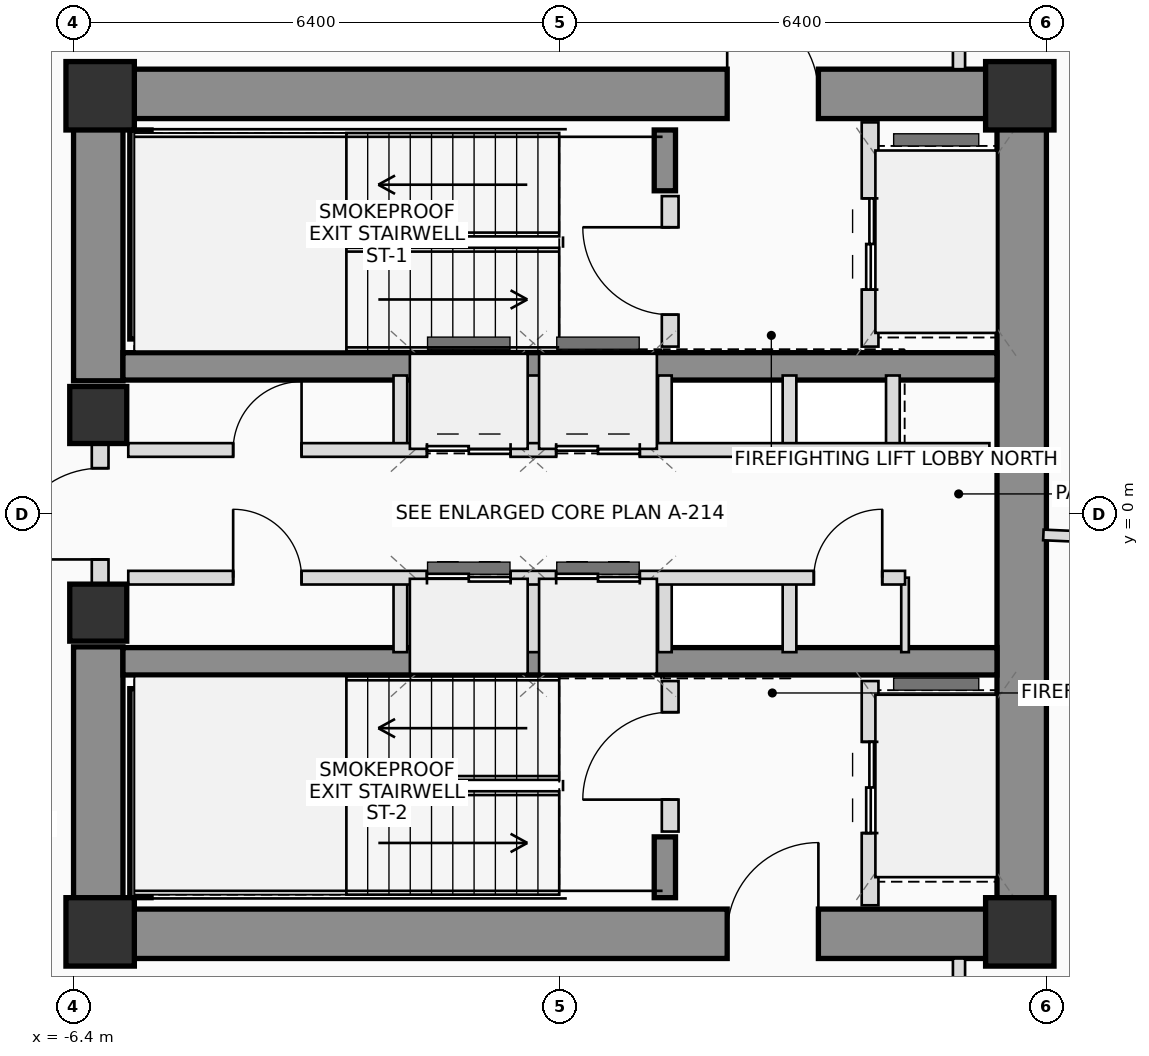
"""IFC4 building model, lengths in metres.
Left out: names, types, materials, properties, quantities, classifications, styles, units other than length and angle.
Written with IfcOpenShell. Run it as: python <this file> out.ifc"""

import sys

from ifc_helpers import new_model, si_unit, direction, frame, frame_2d, origin, origin_2d, place, context, subcontext, project, spatial, rectangle, extrude, source, transform, mapped, element, fill, save


model = new_model("IFC4")
c1 = context("Model", 3, precision=1e-05, world=origin(), true_north=direction((0.0, 1.0)))
c2 = subcontext(c1, "Body", "Model", "MODEL_VIEW")
j1 = project(units=[si_unit("LENGTHUNIT", "METRE"), si_unit("PLANEANGLEUNIT", "RADIAN")], contexts=[c1])
p1 = place(None, origin())
s1 = spatial("IfcSite", under=j1, at=p1, CompositionType="ELEMENT")
p2 = place(p1, origin())
s2 = spatial("IfcBuilding", under=s1, at=p2, CompositionType="ELEMENT")
p3 = place(p2, frame((0.0, 0.0, 146.75)))
s3 = spatial("IfcBuildingStorey", under=s2, at=p3, CompositionType="ELEMENT", Elevation=146.75)
m1 = source(origin(), c2, "Body", "SweptSolid", [
    extrude(rectangle(XDim=0.9, YDim=0.9, at=origin_2d()), origin(), (0.0, 0.0, 1.0), 3.45),
])
for number, where, z_axis, x_axis in (
    (1, (-6.05, -5.5, 0.0), (0.0, 0.0, 1.0), (1.0, 0.0, 0.0)),
    (2, (6.05, -5.5, 0.0), (0.0, 0.0, 1.0), (1.0, 0.0, 0.0)),
    (3, (6.05, 5.5, 0.0), (0.0, 0.0, 1.0), (1.0, 0.0, 0.0)),
    (4, (-6.05, 5.5, 0.0), (0.0, 0.0, 1.0), (1.0, 0.0, 0.0)),
):
    element("IfcColumn", number, at=place(p3, frame(where, z_axis=z_axis, x_axis=x_axis)), inside=s3, PredefinedType="COLUMN", context=c2, shape_type="MappedRepresentation", body=[
        mapped(m1, transform((0.0, 0.0, 0.0), scale=1.0)),
    ])
p4 = place(p3, frame((-6.4, 5.525, 0.0), z_axis=(0.0, 0.0, 1.0), x_axis=(1.0, 0.0, 0.0)))
e5 = element("IfcWall", 5, at=p4, inside=s3, PredefinedType="SHEAR", context=c2, shape_type="SweptSolid", body=[
    extrude(rectangle(XDim=12.8, YDim=0.65, at=frame_2d((6.4, 0.0))), origin(), (0.0, 0.0, 1.0), 3.45),
])
p5 = place(p4, frame((8.6, 0.0, 0.0)))
e6 = element("IfcOpeningElement", 6, at=p5, cuts=e5, PredefinedType="OPENING", context=c2, shape_type="SweptSolid", body=[
    extrude(rectangle(XDim=1.2, YDim=2.2, at=frame_2d((0.6, 1.1))), frame((0.0, 0.335, 0.0), z_axis=(0.0, -1.0, 0.0), x_axis=(1.0, 0.0, 0.0)), (0.0, 0.0, 1.0), 0.67),
])
p6 = place(p3, frame((-6.4, -5.525, 0.0), z_axis=(0.0, 0.0, 1.0), x_axis=(1.0, 0.0, 0.0)))
e7 = element("IfcWall", 7, at=p6, inside=s3, PredefinedType="SHEAR", context=c2, shape_type="SweptSolid", body=[
    extrude(rectangle(XDim=12.8, YDim=0.65, at=frame_2d((6.4, 0.0))), origin(), (0.0, 0.0, 1.0), 3.45),
])
p7 = place(p6, frame((8.6, 0.0, 0.0)))
e8 = element("IfcOpeningElement", 8, at=p7, cuts=e7, PredefinedType="OPENING", context=c2, shape_type="SweptSolid", body=[
    extrude(rectangle(XDim=1.2, YDim=2.2, at=frame_2d((0.6, 1.1))), frame((0.0, 0.335, 0.0), z_axis=(0.0, -1.0, 0.0), x_axis=(1.0, 0.0, 0.0)), (0.0, 0.0, 1.0), 0.67),
])
p8 = place(p3, frame((6.075, -5.2, 0.0), z_axis=(0.0, 0.0, 1.0), x_axis=(0.0, 1.0, 0.0)))
e9 = element("IfcWall", 9, at=p8, inside=s3, PredefinedType="SHEAR", context=c2, shape_type="SweptSolid", body=[
    extrude(rectangle(XDim=10.4, YDim=0.65, at=frame_2d((5.2, 0.0))), origin(), (0.0, 0.0, 1.0), 3.45),
])
for number, where, z_axis, x_axis in (
    (10, (-6.075, -5.2, 0.0), (0.0, 0.0, 1.0), (0.0, 1.0, 0.0)),
    (11, (-6.075, 1.75, 0.0), (0.0, 0.0, 1.0), (0.0, 1.0, 0.0)),
):
    element("IfcWall", number, at=place(p3, frame(where, z_axis=z_axis, x_axis=x_axis)), inside=s3, PredefinedType="SHEAR", context=c2, shape_type="SweptSolid", body=[
        extrude(rectangle(XDim=3.45, YDim=0.65, at=frame_2d((1.725, 0.0))), origin(), (0.0, 0.0, 1.0), 3.45),
    ])
for number, where, z_axis, x_axis in (
    (12, (-5.75, 1.94, 0.0), (0.0, 0.0, 1.0), (1.0, 0.0, 0.0)),
    (13, (-5.75, -1.94, 0.0), (0.0, 0.0, 1.0), (1.0, 0.0, 0.0)),
):
    element("IfcWall", number, at=place(p3, frame(where, z_axis=z_axis, x_axis=x_axis)), inside=s3, PredefinedType="SHEAR", context=c2, shape_type="SweptSolid", body=[
        extrude(rectangle(XDim=11.5, YDim=0.36, at=frame_2d((5.75, 0.0))), origin(), (0.0, 0.0, 1.0), 3.45),
    ])
p9 = place(p3, frame((-5.52, 2.3, 0.0), z_axis=(0.0, 0.0, 1.0), x_axis=(0.0, 1.0, 0.0)))
e14 = element("IfcWall", 14, at=p9, inside=s3, PredefinedType="SHEAR", context=c2, shape_type="SweptSolid", body=[
    extrude(rectangle(XDim=2.75, YDim=0.28, at=frame_2d((1.375, 0.0))), origin(), (0.0, 0.0, 1.0), 3.45),
])
p10 = place(p3, frame((1.38, 4.25, 0.0), z_axis=(0.0, 0.0, 1.0), x_axis=(0.0, 1.0, 0.0)))
e15 = element("IfcWall", 15, at=p10, inside=s3, PredefinedType="SHEAR", context=c2, shape_type="SweptSolid", body=[
    extrude(rectangle(XDim=0.8, YDim=0.28, at=frame_2d((0.4, 0.0))), origin(), (0.0, 0.0, 1.0), 3.45),
])
p11 = place(p3, frame((-5.52, -5.05, 0.0), z_axis=(0.0, 0.0, 1.0), x_axis=(0.0, 1.0, 0.0)))
e16 = element("IfcWall", 16, at=p11, inside=s3, PredefinedType="SHEAR", context=c2, shape_type="SweptSolid", body=[
    extrude(rectangle(XDim=2.75, YDim=0.28, at=frame_2d((1.375, 0.0))), origin(), (0.0, 0.0, 1.0), 3.45),
])
p12 = place(p3, frame((1.38, -5.05, 0.0), z_axis=(0.0, 0.0, 1.0), x_axis=(0.0, 1.0, 0.0)))
e17 = element("IfcWall", 17, at=p12, inside=s3, PredefinedType="SHEAR", context=c2, shape_type="SweptSolid", body=[
    extrude(rectangle(XDim=0.8, YDim=0.28, at=frame_2d((0.4, 0.0))), origin(), (0.0, 0.0, 1.0), 3.45),
])
m2 = source(origin(), c2, "Body", "SweptSolid", [
    extrude(rectangle(XDim=0.75, YDim=0.75, at=origin_2d()), origin(), (0.0, 0.0, 1.0), 3.45),
])
for number, where, z_axis, x_axis in (
    (18, (-6.075, -1.3, 0.0), (0.0, 0.0, 1.0), (1.0, 0.0, 0.0)),
    (19, (-6.075, 1.3, 0.0), (0.0, 0.0, 1.0), (1.0, 0.0, 0.0)),
):
    element("IfcColumn", number, at=place(p3, frame(where, z_axis=z_axis, x_axis=x_axis)), inside=s3, PredefinedType="COLUMN", context=c2, shape_type="MappedRepresentation", body=[
        mapped(m2, transform((0.0, 0.0, 0.0), scale=1.0)),
    ])
p13 = place(p3, frame((-6.05, -0.95, 0.0), z_axis=(0.0, 0.0, 1.0), x_axis=(0.0, 1.0, 0.0)))
e20 = element("IfcWall", 20, at=p13, inside=s3, PredefinedType="PLUMBINGWALL", context=c2, shape_type="SweptSolid", body=[
    extrude(rectangle(XDim=1.9, YDim=0.22, at=frame_2d((0.95, 0.0))), origin(), (0.0, 0.0, 1.0), 2.23),
])
p14 = place(p13, frame((0.35, 0.0, 0.0)))
e21 = element("IfcOpeningElement", 21, at=p14, cuts=e20, PredefinedType="OPENING", context=c2, shape_type="SweptSolid", body=[
    extrude(rectangle(XDim=1.2, YDim=2.2, at=frame_2d((0.6, 1.1))), frame((0.0, 0.12, 0.0), z_axis=(0.0, -1.0, 0.0), x_axis=(1.0, 0.0, 0.0)), (0.0, 0.0, 1.0), 0.24),
])
p15 = place(p3, frame((1.45, 2.2, 0.0), z_axis=(0.0, 0.0, 1.0), x_axis=(0.0, 1.0, 0.0)))
e22 = element("IfcWall", 22, at=p15, inside=s3, PredefinedType="PLUMBINGWALL", context=c2, shape_type="SweptSolid", body=[
    extrude(rectangle(XDim=1.98, YDim=0.22, at=frame_2d((0.99, 0.0))), origin(), (0.0, 0.0, 1.0), 3.25),
])
p16 = place(p15, frame((0.42, 0.0, 0.0)))
e23 = element("IfcOpeningElement", 23, at=p16, cuts=e22, PredefinedType="OPENING", context=c2, shape_type="SweptSolid", body=[
    extrude(rectangle(XDim=1.15, YDim=2.15, at=frame_2d((0.575, 1.075))), frame((0.0, 0.12, 0.0), z_axis=(0.0, -1.0, 0.0), x_axis=(1.0, 0.0, 0.0)), (0.0, 0.0, 1.0), 0.24),
])
p17 = place(p3, frame((4.08, 2.2, 0.0), z_axis=(0.0, 0.0, 1.0), x_axis=(0.0, 1.0, 0.0)))
e24 = element("IfcWall", 24, at=p17, inside=s3, PredefinedType="PLUMBINGWALL", context=c2, shape_type="SweptSolid", body=[
    extrude(rectangle(XDim=2.95, YDim=0.22, at=frame_2d((1.475, 0.0))), origin(), (0.0, 0.0, 1.0), 3.25),
])
p18 = place(p17, frame((0.75, 0.0, 0.0)))
e25 = element("IfcOpeningElement", 25, at=p18, cuts=e24, PredefinedType="OPENING", context=c2, shape_type="SweptSolid", body=[
    extrude(rectangle(XDim=1.2, YDim=2.25, at=frame_2d((0.6, 1.125))), frame((0.0, 0.12, 0.0), z_axis=(0.0, -1.0, 0.0), x_axis=(1.0, 0.0, 0.0)), (0.0, 0.0, 1.0), 0.24),
])
p19 = place(p3, frame((1.45, -4.18, 0.0), z_axis=(0.0, 0.0, 1.0), x_axis=(0.0, 1.0, 0.0)))
e26 = element("IfcWall", 26, at=p19, inside=s3, PredefinedType="PLUMBINGWALL", context=c2, shape_type="SweptSolid", body=[
    extrude(rectangle(XDim=1.98, YDim=0.22, at=frame_2d((0.99, 0.0))), origin(), (0.0, 0.0, 1.0), 3.25),
])
p20 = place(p19, frame((0.42, 0.0, 0.0)))
e27 = element("IfcOpeningElement", 27, at=p20, cuts=e26, PredefinedType="OPENING", context=c2, shape_type="SweptSolid", body=[
    extrude(rectangle(XDim=1.15, YDim=2.15, at=frame_2d((0.575, 1.075))), frame((0.0, 0.12, 0.0), z_axis=(0.0, -1.0, 0.0), x_axis=(1.0, 0.0, 0.0)), (0.0, 0.0, 1.0), 0.24),
])
p21 = place(p3, frame((4.08, -5.15, 0.0), z_axis=(0.0, 0.0, 1.0), x_axis=(0.0, 1.0, 0.0)))
e28 = element("IfcWall", 28, at=p21, inside=s3, PredefinedType="PLUMBINGWALL", context=c2, shape_type="SweptSolid", body=[
    extrude(rectangle(XDim=2.95, YDim=0.22, at=frame_2d((1.475, 0.0))), origin(), (0.0, 0.0, 1.0), 3.25),
])
p22 = place(p21, frame((0.95, 0.0, 0.0)))
e29 = element("IfcOpeningElement", 29, at=p22, cuts=e28, PredefinedType="OPENING", context=c2, shape_type="SweptSolid", body=[
    extrude(rectangle(XDim=1.2, YDim=2.25, at=frame_2d((0.6, 1.125))), frame((0.0, 0.12, 0.0), z_axis=(0.0, -1.0, 0.0), x_axis=(1.0, 0.0, 0.0)), (0.0, 0.0, 1.0), 0.24),
])
for number, where, z_axis, x_axis in (
    (30, (-2.1, 0.84, 0.0), (0.0, 0.0, 1.0), (0.0, 1.0, 0.0)),
    (31, (-2.1, -1.82, 0.0), (0.0, 0.0, 1.0), (0.0, 1.0, 0.0)),
    (32, (-0.35, 0.84, 0.0), (0.0, 0.0, 1.0), (0.0, 1.0, 0.0)),
    (33, (-0.35, -1.82, 0.0), (0.0, 0.0, 1.0), (0.0, 1.0, 0.0)),
    (34, (1.38, 0.84, 0.0), (0.0, 0.0, 1.0), (0.0, 1.0, 0.0)),
    (35, (1.38, -1.82, 0.0), (0.0, 0.0, 1.0), (0.0, 1.0, 0.0)),
    (36, (3.02, 0.84, 0.0), (0.0, 0.0, 1.0), (0.0, 1.0, 0.0)),
    (37, (4.38, 0.84, 0.0), (0.0, 0.0, 1.0), (0.0, 1.0, 0.0)),
    (38, (3.02, -1.82, 0.0), (0.0, 0.0, 1.0), (0.0, 1.0, 0.0)),
):
    element("IfcWall", number, at=place(p3, frame(where, z_axis=z_axis, x_axis=x_axis)), inside=s3, PredefinedType="PLUMBINGWALL", context=c2, shape_type="SweptSolid", body=[
        extrude(rectangle(XDim=0.98, YDim=0.18, at=frame_2d((0.49, 0.0))), origin(), (0.0, 0.0, 1.0), 3.25),
    ])
p23 = place(p3, frame((4.54, -1.82, 0.0), z_axis=(0.0, 0.0, 1.0), x_axis=(0.0, 1.0, 0.0)))
e39 = element("IfcWall", 39, at=p23, inside=s3, PredefinedType="PARTITIONING", context=c2, shape_type="SweptSolid", body=[
    extrude(rectangle(XDim=0.98, YDim=0.1, at=frame_2d((0.49, 0.0))), origin(), (0.0, 0.0, 1.0), 3.25),
])
p24 = place(p3, frame((-5.68, 0.84, 0.0), z_axis=(0.0, 0.0, 1.0), x_axis=(1.0, 0.0, 0.0)))
e40 = element("IfcWall", 40, at=p24, inside=s3, PredefinedType="PLUMBINGWALL", context=c2, shape_type="SweptSolid", body=[
    extrude(rectangle(XDim=11.33, YDim=0.18, at=frame_2d((5.665, 0.0))), origin(), (0.0, 0.0, 1.0), 3.25),
])
p25 = place(p24, frame((1.38, 0.0, 0.0)))
e41 = element("IfcOpeningElement", 41, at=p25, cuts=e40, PredefinedType="OPENING", context=c2, shape_type="SweptSolid", body=[
    extrude(rectangle(XDim=0.9, YDim=2.05, at=frame_2d((0.45, 1.025))), frame((0.0, 0.1, 0.0), z_axis=(0.0, -1.0, 0.0), x_axis=(1.0, 0.0, 0.0)), (0.0, 0.0, 1.0), 0.2),
])
p26 = place(p24, frame((3.93, 0.0, 0.0)))
e42 = element("IfcOpeningElement", 42, at=p26, cuts=e40, PredefinedType="OPENING", context=c2, shape_type="SweptSolid", body=[
    extrude(rectangle(XDim=1.1, YDim=2.2, at=frame_2d((0.55, 1.1))), frame((0.0, 0.1, 0.0), z_axis=(0.0, -1.0, 0.0), x_axis=(1.0, 0.0, 0.0)), (0.0, 0.0, 1.0), 0.2),
])
p27 = place(p24, frame((5.63, 0.0, 0.0)))
e43 = element("IfcOpeningElement", 43, at=p27, cuts=e40, PredefinedType="OPENING", context=c2, shape_type="SweptSolid", body=[
    extrude(rectangle(XDim=1.1, YDim=2.2, at=frame_2d((0.55, 1.1))), frame((0.0, 0.1, 0.0), z_axis=(0.0, -1.0, 0.0), x_axis=(1.0, 0.0, 0.0)), (0.0, 0.0, 1.0), 0.2),
])
p28 = place(p3, frame((-5.68, -0.84, 0.0), z_axis=(0.0, 0.0, 1.0), x_axis=(1.0, 0.0, 0.0)))
e44 = element("IfcWall", 44, at=p28, inside=s3, PredefinedType="PLUMBINGWALL", context=c2, shape_type="SweptSolid", body=[
    extrude(rectangle(XDim=10.22, YDim=0.18, at=frame_2d((5.11, 0.0))), origin(), (0.0, 0.0, 1.0), 3.25),
])
p29 = place(p28, frame((1.38, 0.0, 0.0)))
e45 = element("IfcOpeningElement", 45, at=p29, cuts=e44, PredefinedType="OPENING", context=c2, shape_type="SweptSolid", body=[
    extrude(rectangle(XDim=0.9, YDim=2.05, at=frame_2d((0.45, 1.025))), frame((0.0, 0.1, 0.0), z_axis=(0.0, -1.0, 0.0), x_axis=(1.0, 0.0, 0.0)), (0.0, 0.0, 1.0), 0.2),
])
p30 = place(p28, frame((3.93, 0.0, 0.0)))
e46 = element("IfcOpeningElement", 46, at=p30, cuts=e44, PredefinedType="OPENING", context=c2, shape_type="SweptSolid", body=[
    extrude(rectangle(XDim=1.1, YDim=2.2, at=frame_2d((0.55, 1.1))), frame((0.0, 0.1, 0.0), z_axis=(0.0, -1.0, 0.0), x_axis=(1.0, 0.0, 0.0)), (0.0, 0.0, 1.0), 0.2),
])
p31 = place(p28, frame((5.63, 0.0, 0.0)))
e47 = element("IfcOpeningElement", 47, at=p31, cuts=e44, PredefinedType="OPENING", context=c2, shape_type="SweptSolid", body=[
    extrude(rectangle(XDim=1.1, YDim=2.2, at=frame_2d((0.55, 1.1))), frame((0.0, 0.1, 0.0), z_axis=(0.0, -1.0, 0.0), x_axis=(1.0, 0.0, 0.0)), (0.0, 0.0, 1.0), 0.2),
])
p32 = place(p28, frame((9.02, 0.0, 0.0)))
e48 = element("IfcOpeningElement", 48, at=p32, cuts=e44, PredefinedType="OPENING", context=c2, shape_type="SweptSolid", body=[
    extrude(rectangle(XDim=0.9, YDim=2.05, at=frame_2d((0.45, 1.025))), frame((0.0, 0.1, 0.0), z_axis=(0.0, -1.0, 0.0), x_axis=(1.0, 0.0, 0.0)), (0.0, 0.0, 1.0), 0.2),
])
p33 = place(p3, frame((5.25, 7.5, 0.0), z_axis=(0.0, 0.0, 1.0), x_axis=(0.0, -1.0, 0.0)))
e49 = element("IfcWall", 49, at=p33, inside=s3, PredefinedType="PARTITIONING", context=c2, shape_type="SweptSolid", body=[
    extrude(rectangle(XDim=1.65, YDim=0.16, at=frame_2d((0.825, 0.0))), origin(), (0.0, 0.0, 1.0), 2.605),
])
p34 = place(p3, frame((5.25, -5.85, 0.0), z_axis=(0.0, 0.0, 1.0), x_axis=(0.0, -1.0, 0.0)))
e50 = element("IfcWall", 50, at=p34, inside=s3, PredefinedType="PARTITIONING", context=c2, shape_type="SweptSolid", body=[
    extrude(rectangle(XDim=1.65, YDim=0.16, at=frame_2d((0.825, 0.0))), origin(), (0.0, 0.0, 1.0), 3.25),
])
p35 = place(p3, frame((6.36, -0.278, 0.0), z_axis=(0.0, 0.0, 1.0), x_axis=(0.999047707238, -0.043631166178, 0.0)))
e51 = element("IfcWall", 51, at=p35, inside=s3, PredefinedType="PARTITIONING", context=c2, shape_type="SweptSolid", body=[
    extrude(rectangle(XDim=8.522, YDim=0.14, at=frame_2d((4.261, 0.0))), origin(), (0.0, 0.0, 1.0), 2.605),
])
p36 = place(p5, origin())
e52 = element("IfcDoor", 52, at=p36, inside=s3, OperationType="SINGLE_SWING_LEFT", PredefinedType="DOOR", context=c2, shape_type="SweptSolid", body=[
    extrude(rectangle(XDim=1.2, YDim=2.2, at=frame_2d((0.6, 1.1))), frame((0.0, 0.025, 0.0), z_axis=(0.0, -1.0, 0.0), x_axis=(1.0, 0.0, 0.0)), (0.0, 0.0, 1.0), 0.05),
])
fill(e6, e52)
p37 = place(p7, origin())
e53 = element("IfcDoor", 53, at=p37, inside=s3, OperationType="SINGLE_SWING_RIGHT", PredefinedType="DOOR", context=c2, shape_type="SweptSolid", body=[
    extrude(rectangle(XDim=1.2, YDim=2.2, at=frame_2d((0.6, 1.1))), frame((0.0, 0.025, 0.0), z_axis=(0.0, -1.0, 0.0), x_axis=(1.0, 0.0, 0.0)), (0.0, 0.0, 1.0), 0.05),
])
fill(e8, e53)
p38 = place(p14, origin())
e54 = element("IfcDoor", 54, at=p38, inside=s3, OperationType="SINGLE_SWING_LEFT", PredefinedType="DOOR", context=c2, shape_type="SweptSolid", body=[
    extrude(rectangle(XDim=1.2, YDim=2.2, at=frame_2d((0.6, 1.1))), frame((0.0, 0.025, 0.0), z_axis=(0.0, -1.0, 0.0), x_axis=(1.0, 0.0, 0.0)), (0.0, 0.0, 1.0), 0.05),
])
fill(e21, e54)
p39 = place(p16, origin())
e55 = element("IfcDoor", 55, at=p39, inside=s3, OperationType="SINGLE_SWING_RIGHT", PredefinedType="DOOR", context=c2, shape_type="SweptSolid", body=[
    extrude(rectangle(XDim=1.15, YDim=2.15, at=frame_2d((0.575, 1.075))), frame((0.0, 0.025, 0.0), z_axis=(0.0, -1.0, 0.0), x_axis=(1.0, 0.0, 0.0)), (0.0, 0.0, 1.0), 0.05),
])
fill(e23, e55)
p40 = place(p18, origin())
e56 = element("IfcDoor", 56, at=p40, inside=s3, OperationType="DOUBLE_DOOR_SLIDING", PredefinedType="DOOR", context=c2, shape_type="SweptSolid", body=[
    extrude(rectangle(XDim=1.2, YDim=2.25, at=frame_2d((0.6, 1.125))), frame((0.0, 0.025, 0.0), z_axis=(0.0, -1.0, 0.0), x_axis=(1.0, 0.0, 0.0)), (0.0, 0.0, 1.0), 0.05),
])
fill(e25, e56)
p41 = place(p20, origin())
e57 = element("IfcDoor", 57, at=p41, inside=s3, OperationType="SINGLE_SWING_LEFT", PredefinedType="DOOR", context=c2, shape_type="SweptSolid", body=[
    extrude(rectangle(XDim=1.15, YDim=2.15, at=frame_2d((0.575, 1.075))), frame((0.0, 0.025, 0.0), z_axis=(0.0, -1.0, 0.0), x_axis=(1.0, 0.0, 0.0)), (0.0, 0.0, 1.0), 0.05),
])
fill(e27, e57)
p42 = place(p22, origin())
e58 = element("IfcDoor", 58, at=p42, inside=s3, OperationType="DOUBLE_DOOR_SLIDING", PredefinedType="DOOR", context=c2, shape_type="SweptSolid", body=[
    extrude(rectangle(XDim=1.2, YDim=2.25, at=frame_2d((0.6, 1.125))), frame((0.0, 0.025, 0.0), z_axis=(0.0, -1.0, 0.0), x_axis=(1.0, 0.0, 0.0)), (0.0, 0.0, 1.0), 0.05),
])
fill(e29, e58)
p43 = place(p25, origin())
e59 = element("IfcDoor", 59, at=p43, inside=s3, OperationType="SINGLE_SWING_RIGHT", PredefinedType="DOOR", context=c2, shape_type="SweptSolid", body=[
    extrude(rectangle(XDim=0.9, YDim=2.05, at=frame_2d((0.45, 1.025))), frame((0.0, 0.025, 0.0), z_axis=(0.0, -1.0, 0.0), x_axis=(1.0, 0.0, 0.0)), (0.0, 0.0, 1.0), 0.05),
])
fill(e41, e59)
p44 = place(p26, origin())
e60 = element("IfcDoor", 60, at=p44, inside=s3, OperationType="DOUBLE_DOOR_SLIDING", PredefinedType="DOOR", context=c2, shape_type="SweptSolid", body=[
    extrude(rectangle(XDim=1.1, YDim=2.2, at=frame_2d((0.55, 1.1))), frame((0.0, 0.025, 0.0), z_axis=(0.0, -1.0, 0.0), x_axis=(1.0, 0.0, 0.0)), (0.0, 0.0, 1.0), 0.05),
])
fill(e42, e60)
p45 = place(p27, origin())
e61 = element("IfcDoor", 61, at=p45, inside=s3, OperationType="DOUBLE_DOOR_SLIDING", PredefinedType="DOOR", context=c2, shape_type="SweptSolid", body=[
    extrude(rectangle(XDim=1.1, YDim=2.2, at=frame_2d((0.55, 1.1))), frame((0.0, 0.025, 0.0), z_axis=(0.0, -1.0, 0.0), x_axis=(1.0, 0.0, 0.0)), (0.0, 0.0, 1.0), 0.05),
])
fill(e43, e61)
p46 = place(p29, origin())
e62 = element("IfcDoor", 62, at=p46, inside=s3, OperationType="SINGLE_SWING_LEFT", PredefinedType="DOOR", context=c2, shape_type="SweptSolid", body=[
    extrude(rectangle(XDim=0.9, YDim=2.05, at=frame_2d((0.45, 1.025))), frame((0.0, 0.025, 0.0), z_axis=(0.0, -1.0, 0.0), x_axis=(1.0, 0.0, 0.0)), (0.0, 0.0, 1.0), 0.05),
])
fill(e45, e62)
p47 = place(p30, origin())
e63 = element("IfcDoor", 63, at=p47, inside=s3, OperationType="DOUBLE_DOOR_SLIDING", PredefinedType="DOOR", context=c2, shape_type="SweptSolid", body=[
    extrude(rectangle(XDim=1.1, YDim=2.2, at=frame_2d((0.55, 1.1))), frame((0.0, 0.025, 0.0), z_axis=(0.0, -1.0, 0.0), x_axis=(1.0, 0.0, 0.0)), (0.0, 0.0, 1.0), 0.05),
])
fill(e46, e63)
p48 = place(p31, origin())
e64 = element("IfcDoor", 64, at=p48, inside=s3, OperationType="DOUBLE_DOOR_SLIDING", PredefinedType="DOOR", context=c2, shape_type="SweptSolid", body=[
    extrude(rectangle(XDim=1.1, YDim=2.2, at=frame_2d((0.55, 1.1))), frame((0.0, 0.025, 0.0), z_axis=(0.0, -1.0, 0.0), x_axis=(1.0, 0.0, 0.0)), (0.0, 0.0, 1.0), 0.05),
])
fill(e47, e64)
p49 = place(p32, origin())
e65 = element("IfcDoor", 65, at=p49, inside=s3, OperationType="SINGLE_SWING_RIGHT", PredefinedType="DOOR", context=c2, shape_type="SweptSolid", body=[
    extrude(rectangle(XDim=0.9, YDim=2.05, at=frame_2d((0.45, 1.025))), frame((0.0, 0.025, 0.0), z_axis=(0.0, -1.0, 0.0), x_axis=(1.0, 0.0, 0.0)), (0.0, 0.0, 1.0), 0.05),
])
fill(e48, e65)
save(model, sys.argv[1])
